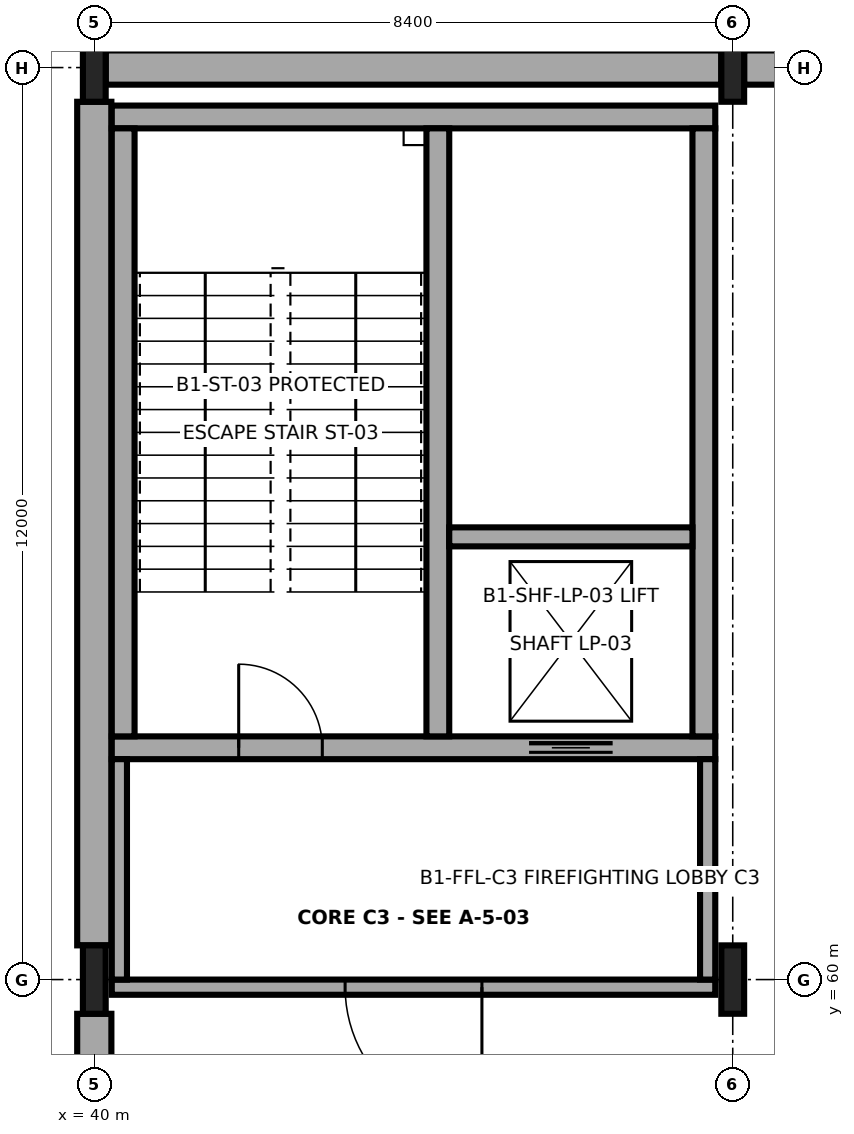
"""IFC4 building model, lengths in metres.
Left out: names, types, materials, properties, quantities, classifications, styles, units other than length and angle.
Written with IfcOpenShell. Run it as: python <this file> out.ifc"""

import sys

from ifc_helpers import new_model, si_unit, direction, frame, frame_2d, origin, origin_2d, place, context, subcontext, project, spatial, rectangle, i_section, extrude, element, fill, save


model = new_model("IFC4")
c1 = context("Model", 3, precision=1e-05, world=origin(), true_north=direction((0.0, 1.0)))
c2 = subcontext(c1, "Body", "Model", "MODEL_VIEW")
j1 = project(units=[si_unit("LENGTHUNIT", "METRE"), si_unit("PLANEANGLEUNIT", "RADIAN")], contexts=[c1])
p1 = place(None, origin())
s1 = spatial("IfcSite", under=j1, at=p1, CompositionType="ELEMENT")
p2 = place(p1, origin())
s2 = spatial("IfcBuilding", under=s1, at=p2, CompositionType="ELEMENT")
p3 = place(p2, frame((0.0, 0.0, -4.8)))
s3 = spatial("IfcBuildingStorey", under=s2, at=p3, CompositionType="ELEMENT", Elevation=-4.8)
for number, where, z_axis, x_axis in (
    (1, (40.0, 60.0, 0.0), (0.0, 0.0, 1.0), (1.0, 0.0, 0.0)),
    (2, (40.0, 72.0, 0.0), (0.0, 0.0, 1.0), (1.0, 0.0, 0.0)),
    (3, (48.4, 60.0, 0.0), (0.0, 0.0, 1.0), (1.0, 0.0, 0.0)),
    (4, (48.4, 72.0, 0.0), (0.0, 0.0, 1.0), (1.0, 0.0, 0.0)),
):
    element("IfcColumn", number, at=place(p3, frame(where, z_axis=z_axis, x_axis=x_axis)), inside=s3, PredefinedType="COLUMN", context=c2, shape_type="SweptSolid", body=[
        extrude(i_section(OverallWidth=0.3, OverallDepth=0.9, WebThickness=0.019, FlangeThickness=0.035, FilletRadius=0.03, at=origin_2d()), origin(), (0.0, 0.0, 1.0), 4.8),
    ])
p4 = place(p3, frame((40.15, 72.0, 0.0), z_axis=(0.0, 0.0, 1.0), x_axis=(1.0, 0.0, 0.0)))
e5 = element("IfcWall", 5, at=p4, inside=s3, PredefinedType="USERDEFINED", context=c2, shape_type="SweptSolid", body=[
    extrude(rectangle(XDim=8.1, YDim=0.45, at=frame_2d((4.05, 0.0))), origin(), (0.0, 0.0, 1.0), 4.48),
])
p5 = place(p3, frame((48.55, 72.0, 0.0), z_axis=(0.0, 0.0, 1.0), x_axis=(1.0, 0.0, 0.0)))
e6 = element("IfcWall", 6, at=p5, inside=s3, PredefinedType="USERDEFINED", context=c2, shape_type="SweptSolid", body=[
    extrude(rectangle(XDim=8.1, YDim=0.45, at=frame_2d((4.05, 0.0))), origin(), (0.0, 0.0, 1.0), 4.48),
])
for number, where, z_axis, x_axis in (
    (7, (40.0, 48.45, 0.0), (0.0, 0.0, 1.0), (0.0, 1.0, 0.0)),
    (8, (40.0, 60.45, 0.0), (0.0, 0.0, 1.0), (0.0, 1.0, 0.0)),
):
    element("IfcWall", number, at=place(p3, frame(where, z_axis=z_axis, x_axis=x_axis)), inside=s3, PredefinedType="USERDEFINED", context=c2, shape_type="SweptSolid", body=[
        extrude(rectangle(XDim=11.1, YDim=0.45, at=frame_2d((5.55, 0.0))), origin(), (0.0, 0.0, 1.0), 4.48),
    ])
p6 = place(p3, frame((40.23, 63.05, 0.0), z_axis=(0.0, 0.0, 1.0), x_axis=(1.0, 0.0, 0.0)))
e9 = element("IfcWall", 9, at=p6, inside=s3, PredefinedType="SHEAR", context=c2, shape_type="SweptSolid", body=[
    extrude(rectangle(XDim=7.94, YDim=0.3, at=frame_2d((3.97, 0.0))), origin(), (0.0, 0.0, 1.0), 4.5),
])
p7 = place(p6, frame((1.67, 0.0, 0.0)))
e10 = element("IfcOpeningElement", 10, at=p7, cuts=e9, PredefinedType="OPENING", context=c2, shape_type="SweptSolid", body=[
    extrude(rectangle(XDim=1.1, YDim=2.2, at=frame_2d((0.55, 1.1))), frame((0.0, 0.16, 0.0), z_axis=(0.0, -1.0, 0.0), x_axis=(1.0, 0.0, 0.0)), (0.0, 0.0, 1.0), 0.32),
])
p8 = place(p6, frame((5.49, 0.0, 0.0)))
e11 = element("IfcOpeningElement", 11, at=p8, cuts=e9, PredefinedType="OPENING", context=c2, shape_type="SweptSolid", body=[
    extrude(rectangle(XDim=1.1, YDim=2.1, at=frame_2d((0.55, 1.05))), frame((0.0, 0.16, 0.0), z_axis=(0.0, -1.0, 0.0), x_axis=(1.0, 0.0, 0.0)), (0.0, 0.0, 1.0), 0.32),
])
p9 = place(p3, frame((48.17, 71.35, 0.0), z_axis=(0.0, 0.0, 1.0), x_axis=(-1.0, 0.0, 0.0)))
e12 = element("IfcWall", 12, at=p9, inside=s3, PredefinedType="SHEAR", context=c2, shape_type="SweptSolid", body=[
    extrude(rectangle(XDim=7.94, YDim=0.3, at=frame_2d((3.97, 0.0))), origin(), (0.0, 0.0, 1.0), 4.5),
])
for number, where, z_axis, x_axis in (
    (13, (40.38, 71.2, 0.0), (0.0, 0.0, 1.0), (0.0, -1.0, 0.0)),
    (14, (48.02, 63.2, 0.0), (0.0, 0.0, 1.0), (0.0, 1.0, 0.0)),
    (15, (44.52, 63.2, 0.0), (0.0, 0.0, 1.0), (0.0, 1.0, 0.0)),
):
    element("IfcWall", number, at=place(p3, frame(where, z_axis=z_axis, x_axis=x_axis)), inside=s3, PredefinedType="SHEAR", context=c2, shape_type="SweptSolid", body=[
        extrude(rectangle(XDim=8.0, YDim=0.3, at=frame_2d((4.0, 0.0))), origin(), (0.0, 0.0, 1.0), 4.5),
    ])
p10 = place(p3, frame((44.67, 65.825, 0.0), z_axis=(0.0, 0.0, 1.0), x_axis=(1.0, 0.0, 0.0)))
e16 = element("IfcWall", 16, at=p10, inside=s3, PredefinedType="SHEAR", context=c2, shape_type="SweptSolid", body=[
    extrude(rectangle(XDim=3.2, YDim=0.25, at=frame_2d((1.6, 0.0))), origin(), (0.0, 0.0, 1.0), 4.5),
])
p11 = place(p3, frame((48.17, 59.9, 0.0), z_axis=(0.0, 0.0, 1.0), x_axis=(-1.0, 0.0, 0.0)))
e17 = element("IfcWall", 17, at=p11, inside=s3, PredefinedType="SOLIDWALL", context=c2, shape_type="SweptSolid", body=[
    extrude(rectangle(XDim=7.94, YDim=0.2, at=frame_2d((3.97, 0.0))), origin(), (0.0, 0.0, 1.0), 3.782),
])
p12 = place(p11, frame((3.07, 0.0, 0.0)))
e18 = element("IfcOpeningElement", 18, at=p12, cuts=e17, PredefinedType="OPENING", context=c2, shape_type="SweptSolid", body=[
    extrude(rectangle(XDim=1.8, YDim=2.2, at=frame_2d((0.9, 1.1))), frame((0.0, 0.11, 0.0), z_axis=(0.0, -1.0, 0.0), x_axis=(1.0, 0.0, 0.0)), (0.0, 0.0, 1.0), 0.22),
])
for number, where, z_axis, x_axis in (
    (19, (40.33, 60.0, 0.0), (0.0, 0.0, 1.0), (0.0, 1.0, 0.0)),
    (20, (48.07, 62.9, 0.0), (0.0, 0.0, 1.0), (0.0, -1.0, 0.0)),
):
    element("IfcWall", number, at=place(p3, frame(where, z_axis=z_axis, x_axis=x_axis)), inside=s3, PredefinedType="SOLIDWALL", context=c2, shape_type="SweptSolid", body=[
        extrude(rectangle(XDim=2.9, YDim=0.2, at=frame_2d((1.45, 0.0))), origin(), (0.0, 0.0, 1.0), 3.832),
    ])
p13 = place(p7, origin())
e21 = element("IfcDoor", 21, at=p13, inside=s3, OperationType="SINGLE_SWING_LEFT", PredefinedType="DOOR", context=c2, shape_type="SweptSolid", body=[
    extrude(rectangle(XDim=1.1, YDim=2.2, at=frame_2d((0.55, 1.1))), frame((0.0, 0.025, 0.0), z_axis=(0.0, -1.0, 0.0), x_axis=(1.0, 0.0, 0.0)), (0.0, 0.0, 1.0), 0.05),
])
fill(e10, e21)
p14 = place(p8, origin())
e22 = element("IfcDoor", 22, at=p14, inside=s3, OperationType="SLIDING_TO_LEFT", PredefinedType="DOOR", context=c2, shape_type="SweptSolid", body=[
    extrude(rectangle(XDim=1.1, YDim=2.1, at=frame_2d((0.55, 1.05))), frame((0.0, 0.025, 0.0), z_axis=(0.0, -1.0, 0.0), x_axis=(1.0, 0.0, 0.0)), (0.0, 0.0, 1.0), 0.05),
])
fill(e11, e22)
p15 = place(p12, origin())
e23 = element("IfcDoor", 23, at=p15, inside=s3, OperationType="DOUBLE_DOOR_SINGLE_SWING", PredefinedType="DOOR", context=c2, shape_type="SweptSolid", body=[
    extrude(rectangle(XDim=1.8, YDim=2.2, at=frame_2d((0.9, 1.1))), frame((0.0, 0.025, 0.0), z_axis=(0.0, -1.0, 0.0), x_axis=(1.0, 0.0, 0.0)), (0.0, 0.0, 1.0), 0.05),
])
fill(e18, e23)
save(model, sys.argv[1])
